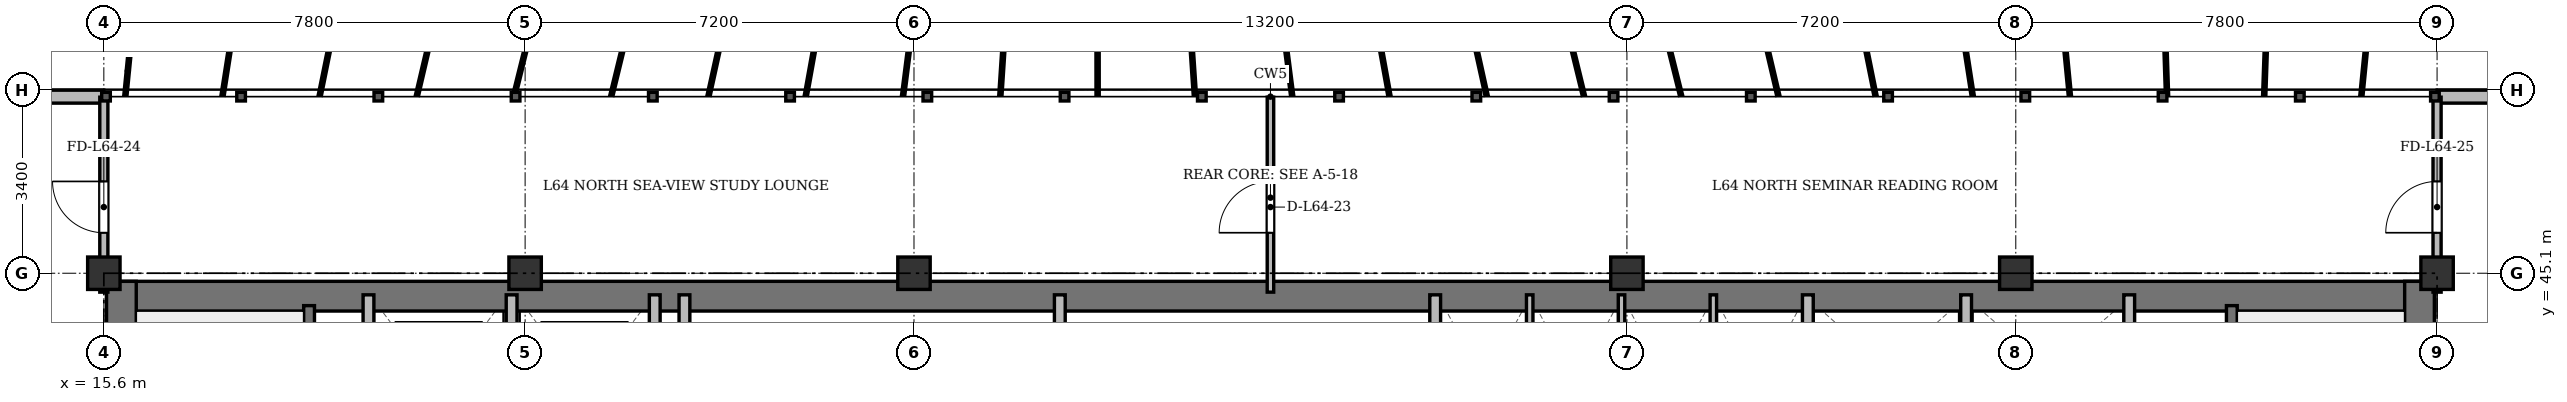
"""IFC4 building model, lengths in metres.
Left out: names, types, materials, properties, quantities, classifications, styles, units other than length and angle.
Written with IfcOpenShell. Run it as: python <this file> out.ifc"""

import sys

from ifc_helpers import new_model, si_unit, direction, frame, frame_2d, origin, origin_2d, place, context, subcontext, project, spatial, rectangle, extrude, source, transform, mapped, element, fill, save


model = new_model("IFC4")
c1 = context("Model", 3, precision=1e-05, world=origin(), true_north=direction((0.0, 1.0)))
c2 = subcontext(c1, "Body", "Model", "MODEL_VIEW")
j1 = project(units=[si_unit("LENGTHUNIT", "METRE"), si_unit("PLANEANGLEUNIT", "RADIAN")], contexts=[c1])
p1 = place(None, origin())
s1 = spatial("IfcSite", under=j1, at=p1, CompositionType="ELEMENT")
p2 = place(p1, origin())
s2 = spatial("IfcBuilding", under=s1, at=p2, CompositionType="ELEMENT")
p3 = place(p2, frame((0.0, 0.0, 248.7)))
s3 = spatial("IfcBuildingStorey", under=s2, at=p3, CompositionType="ELEMENT", Elevation=248.7)
m1 = source(origin(), c2, "Body", "SweptSolid", [
    extrude(rectangle(XDim=0.6, YDim=0.6, at=origin_2d()), origin(), (0.0, 0.0, 1.0), 3.6),
])
for number, where, z_axis, x_axis in (
    (1, (15.6, 45.1, 0.0), (0.0, 0.0, 1.0), (1.0, 0.0, 0.0)),
    (2, (23.4, 45.1, 0.0), (0.0, 0.0, 1.0), (1.0, 0.0, 0.0)),
    (3, (30.6, 45.1, 0.0), (0.0, 0.0, 1.0), (1.0, 0.0, 0.0)),
    (4, (43.8, 45.1, 0.0), (0.0, 0.0, 1.0), (1.0, 0.0, 0.0)),
    (5, (51.0, 45.1, 0.0), (0.0, 0.0, 1.0), (1.0, 0.0, 0.0)),
    (6, (58.8, 45.1, 0.0), (0.0, 0.0, 1.0), (1.0, 0.0, 0.0)),
):
    element("IfcColumn", number, at=place(p3, frame(where, z_axis=z_axis, x_axis=x_axis)), inside=s3, PredefinedType="COLUMN", context=c2, shape_type="MappedRepresentation", body=[
        mapped(m1, transform((0.0, 0.0, 0.0), x_axis=(1.0, 0.0, 0.0), y_axis=(0.0, 1.0, 0.0), z_axis=(0.0, 0.0, 1.0), scale=1.0)),
    ])
p4 = place(p3, frame((11.3, 48.37, 0.0), z_axis=(0.0, 0.0, 1.0), x_axis=(1.0, 0.0, 0.0)))
e7 = element("IfcWall", 7, at=p4, inside=s3, PredefinedType="SOLIDWALL", context=c2, shape_type="SweptSolid", body=[
    extrude(rectangle(XDim=4.3, YDim=0.24, at=frame_2d((2.15, 0.0))), origin(), (0.0, 0.0, 1.0), 3.37),
])
p5 = place(p4, frame((1.46, 0.0, 0.9)))
e8 = element("IfcOpeningElement", 8, at=p5, cuts=e7, PredefinedType="OPENING", context=c2, shape_type="SweptSolid", body=[
    extrude(rectangle(XDim=1.2, YDim=1.65, at=frame_2d((0.6, 0.825))), frame((0.0, 0.13, 0.0), z_axis=(0.0, -1.0, 0.0), x_axis=(1.0, 0.0, 0.0)), (0.0, 0.0, 1.0), 0.26),
])
p6 = place(p3, frame((58.8, 48.37, 0.0), z_axis=(0.0, 0.0, 1.0), x_axis=(1.0, 0.0, 0.0)))
e9 = element("IfcWall", 9, at=p6, inside=s3, PredefinedType="SOLIDWALL", context=c2, shape_type="SweptSolid", body=[
    extrude(rectangle(XDim=4.3, YDim=0.24, at=frame_2d((2.15, 0.0))), origin(), (0.0, 0.0, 1.0), 3.37),
])
p7 = place(p6, frame((1.46, 0.0, 0.9)))
e10 = element("IfcOpeningElement", 10, at=p7, cuts=e9, PredefinedType="OPENING", context=c2, shape_type="SweptSolid", body=[
    extrude(rectangle(XDim=1.2, YDim=1.65, at=frame_2d((0.6, 0.825))), frame((0.0, 0.13, 0.0), z_axis=(0.0, -1.0, 0.0), x_axis=(1.0, 0.0, 0.0)), (0.0, 0.0, 1.0), 0.26),
])
p8 = place(p3, frame((15.65, 44.675, 0.0), z_axis=(0.0, 0.0, 1.0), x_axis=(1.0, 0.0, 0.0)))
e11 = element("IfcWall", 11, at=p8, inside=s3, PredefinedType="SHEAR", context=c2, shape_type="SweptSolid", body=[
    extrude(rectangle(XDim=43.1, YDim=0.55, at=frame_2d((21.55, 0.0))), origin(), (0.0, 0.0, 1.0), 3.37),
])
for number, where, z_axis, x_axis in (
    (12, (15.925, 33.4, 0.0), (0.0, 0.0, 1.0), (0.0, 1.0, 0.0)),
    (13, (58.475, 33.4, 0.0), (0.0, 0.0, 1.0), (0.0, 1.0, 0.0)),
):
    element("IfcWall", number, at=place(p3, frame(where, z_axis=z_axis, x_axis=x_axis)), inside=s3, PredefinedType="SHEAR", context=c2, shape_type="SweptSolid", body=[
        extrude(rectangle(XDim=11.55, YDim=0.55, at=frame_2d((5.775, 0.0))), origin(), (0.0, 0.0, 1.0), 3.37),
    ])
p9 = place(p3, frame((19.4, 33.4, 0.0), z_axis=(0.0, 0.0, 1.0), x_axis=(0.0, 1.0, 0.0)))
e14 = element("IfcWall", 14, at=p9, inside=s3, PredefinedType="SHEAR", context=c2, shape_type="SweptSolid", body=[
    extrude(rectangle(XDim=11.1, YDim=0.2, at=frame_2d((5.55, 0.0))), origin(), (0.0, 0.0, 1.0), 3.37),
])
p10 = place(p9, frame((0.85, 0.0, 0.0)))
e15 = element("IfcOpeningElement", 15, at=p10, cuts=e14, PredefinedType="OPENING", context=c2, shape_type="SweptSolid", body=[
    extrude(rectangle(XDim=1.1, YDim=2.15, at=frame_2d((0.55, 1.075))), frame((0.0, 0.11, 0.0), z_axis=(0.0, -1.0, 0.0), x_axis=(1.0, 0.0, 0.0)), (0.0, 0.0, 1.0), 0.22),
])
p11 = place(p3, frame((55.0, 33.4, 0.0), z_axis=(0.0, 0.0, 1.0), x_axis=(0.0, 1.0, 0.0)))
e16 = element("IfcWall", 16, at=p11, inside=s3, PredefinedType="SHEAR", context=c2, shape_type="SweptSolid", body=[
    extrude(rectangle(XDim=11.1, YDim=0.2, at=frame_2d((5.55, 0.0))), origin(), (0.0, 0.0, 1.0), 3.37),
])
p12 = place(p11, frame((0.85, 0.0, 0.0)))
e17 = element("IfcOpeningElement", 17, at=p12, cuts=e16, PredefinedType="OPENING", context=c2, shape_type="SweptSolid", body=[
    extrude(rectangle(XDim=1.1, YDim=2.15, at=frame_2d((0.55, 1.075))), frame((0.0, 0.11, 0.0), z_axis=(0.0, -1.0, 0.0), x_axis=(1.0, 0.0, 0.0)), (0.0, 0.0, 1.0), 0.22),
])
for number, where, z_axis, x_axis in (
    (18, (20.5, 41.3, 0.0), (0.0, 0.0, 1.0), (0.0, 1.0, 0.0)),
    (19, (23.15, 41.3, 0.0), (0.0, 0.0, 1.0), (0.0, 1.0, 0.0)),
    (20, (25.8, 41.3, 0.0), (0.0, 0.0, 1.0), (0.0, 1.0, 0.0)),
):
    element("IfcWall", number, at=place(p3, frame(where, z_axis=z_axis, x_axis=x_axis)), inside=s3, PredefinedType="SOLIDWALL", context=c2, shape_type="SweptSolid", body=[
        extrude(rectangle(XDim=3.4, YDim=0.2, at=frame_2d((1.7, 0.0))), origin(), (0.0, 0.0, 1.0), 3.37),
    ])
for number, where, z_axis, x_axis in (
    (21, (26.35, 33.4, 0.0), (0.0, 0.0, 1.0), (0.0, 1.0, 0.0)),
    (22, (33.3, 33.4, 0.0), (0.0, 0.0, 1.0), (0.0, 1.0, 0.0)),
):
    element("IfcWall", number, at=place(p3, frame(where, z_axis=z_axis, x_axis=x_axis)), inside=s3, PredefinedType="SOLIDWALL", context=c2, shape_type="SweptSolid", body=[
        extrude(rectangle(XDim=11.3, YDim=0.2, at=frame_2d((5.65, 0.0))), origin(), (0.0, 0.0, 1.0), 2.92),
    ])
p13 = place(p3, frame((40.25, 41.5, 0.0), z_axis=(0.0, 0.0, 1.0), x_axis=(0.0, 1.0, 0.0)))
e23 = element("IfcWall", 23, at=p13, inside=s3, PredefinedType="SOLIDWALL", context=c2, shape_type="SweptSolid", body=[
    extrude(rectangle(XDim=3.2, YDim=0.2, at=frame_2d((1.6, 0.0))), origin(), (0.0, 0.0, 1.0), 3.37),
])
for number, where, z_axis, x_axis in (
    (24, (42.0, 41.5, 0.0), (0.0, 0.0, 1.0), (0.0, 1.0, 0.0)),
    (25, (43.7, 41.5, 0.0), (0.0, 0.0, 1.0), (0.0, 1.0, 0.0)),
    (26, (45.4, 41.5, 0.0), (0.0, 0.0, 1.0), (0.0, 1.0, 0.0)),
):
    element("IfcWall", number, at=place(p3, frame(where, z_axis=z_axis, x_axis=x_axis)), inside=s3, PredefinedType="PARTITIONING", context=c2, shape_type="SweptSolid", body=[
        extrude(rectangle(XDim=3.2, YDim=0.12, at=frame_2d((1.6, 0.0))), origin(), (0.0, 0.0, 1.0), 3.37),
    ])
p14 = place(p3, frame((47.15, 33.4, 0.0), z_axis=(0.0, 0.0, 1.0), x_axis=(0.0, 1.0, 0.0)))
e27 = element("IfcWall", 27, at=p14, inside=s3, PredefinedType="SOLIDWALL", context=c2, shape_type="SweptSolid", body=[
    extrude(rectangle(XDim=11.3, YDim=0.2, at=frame_2d((5.65, 0.0))), origin(), (0.0, 0.0, 1.0), 2.92),
])
for number, where, z_axis, x_axis in (
    (28, (50.08, 42.05, 0.0), (0.0, 0.0, 1.0), (0.0, 1.0, 0.0)),
    (29, (53.1, 42.05, 0.0), (0.0, 0.0, 1.0), (0.0, 1.0, 0.0)),
):
    element("IfcWall", number, at=place(p3, frame(where, z_axis=z_axis, x_axis=x_axis)), inside=s3, PredefinedType="SOLIDWALL", context=c2, shape_type="SweptSolid", body=[
        extrude(rectangle(XDim=2.65, YDim=0.2, at=frame_2d((1.325, 0.0))), origin(), (0.0, 0.0, 1.0), 3.37),
    ])
p15 = place(p3, frame((37.2, 44.75, 0.0), z_axis=(0.0, 0.0, 1.0), x_axis=(0.0, 1.0, 0.0)))
e30 = element("IfcWall", 30, at=p15, inside=s3, PredefinedType="PARTITIONING", context=c2, shape_type="SweptSolid", body=[
    extrude(rectangle(XDim=3.61, YDim=0.12, at=frame_2d((1.805, 0.0))), origin(), (0.0, 0.0, 1.0), 2.92),
])
p16 = place(p15, frame((1.1, 0.0, 0.0)))
e31 = element("IfcOpeningElement", 31, at=p16, cuts=e30, PredefinedType="OPENING", context=c2, shape_type="SweptSolid", body=[
    extrude(rectangle(XDim=0.95, YDim=2.15, at=frame_2d((0.475, 1.075))), frame((0.0, 0.07, 0.0), z_axis=(0.0, -1.0, 0.0), x_axis=(1.0, 0.0, 0.0)), (0.0, 0.0, 1.0), 0.14),
])
p17 = place(p3, frame((15.6, 44.75, 0.0), z_axis=(0.0, 0.0, 1.0), x_axis=(0.0, 1.0, 0.0)))
e32 = element("IfcWall", 32, at=p17, inside=s3, PredefinedType="PARTITIONING", context=c2, shape_type="SweptSolid", body=[
    extrude(rectangle(XDim=3.61, YDim=0.15, at=frame_2d((1.805, 0.0))), origin(), (0.0, 0.0, 1.0), 2.87),
])
p18 = place(p17, frame((1.1, 0.0, 0.0)))
e33 = element("IfcOpeningElement", 33, at=p18, cuts=e32, PredefinedType="OPENING", context=c2, shape_type="SweptSolid", body=[
    extrude(rectangle(XDim=0.95, YDim=2.15, at=frame_2d((0.475, 1.075))), frame((0.0, 0.085, 0.0), z_axis=(0.0, -1.0, 0.0), x_axis=(1.0, 0.0, 0.0)), (0.0, 0.0, 1.0), 0.17),
])
p19 = place(p3, frame((58.8, 44.75, 0.0), z_axis=(0.0, 0.0, 1.0), x_axis=(0.0, 1.0, 0.0)))
e34 = element("IfcWall", 34, at=p19, inside=s3, PredefinedType="PARTITIONING", context=c2, shape_type="SweptSolid", body=[
    extrude(rectangle(XDim=3.61, YDim=0.15, at=frame_2d((1.805, 0.0))), origin(), (0.0, 0.0, 1.0), 2.87),
])
p20 = place(p19, frame((1.1, 0.0, 0.0)))
e35 = element("IfcOpeningElement", 35, at=p20, cuts=e34, PredefinedType="OPENING", context=c2, shape_type="SweptSolid", body=[
    extrude(rectangle(XDim=0.95, YDim=2.15, at=frame_2d((0.475, 1.075))), frame((0.0, 0.085, 0.0), z_axis=(0.0, -1.0, 0.0), x_axis=(1.0, 0.0, 0.0)), (0.0, 0.0, 1.0), 0.17),
])
m2 = source(origin(), c2, "Body", "SweptSolid", [
    extrude(rectangle(XDim=0.95, YDim=2.15, at=frame_2d((0.475, 1.075))), frame((0.0, 0.025, 0.0), z_axis=(0.0, -1.0, 0.0), x_axis=(1.0, 0.0, 0.0)), (0.0, 0.0, 1.0), 0.05),
])
p21 = place(p16, origin())
e36 = element("IfcDoor", 36, at=p21, inside=s3, OperationType="SINGLE_SWING_LEFT", PredefinedType="DOOR", context=c2, shape_type="MappedRepresentation", body=[
    mapped(m2, transform((0.0, 0.0, 0.0), x_axis=(1.0, 0.0, 0.0), y_axis=(0.0, 1.0, 0.0), z_axis=(0.0, 0.0, 1.0), scale=1.0)),
])
fill(e31, e36)
p22 = place(p18, origin())
e37 = element("IfcDoor", 37, at=p22, inside=s3, OperationType="SINGLE_SWING_RIGHT", PredefinedType="DOOR", context=c2, shape_type="MappedRepresentation", body=[
    mapped(m2, transform((0.0, 0.0, 0.0), x_axis=(1.0, 0.0, 0.0), y_axis=(0.0, 1.0, 0.0), z_axis=(0.0, 0.0, 1.0), scale=1.0)),
])
fill(e33, e37)
p23 = place(p20, origin())
e38 = element("IfcDoor", 38, at=p23, inside=s3, OperationType="SINGLE_SWING_LEFT", PredefinedType="DOOR", context=c2, shape_type="MappedRepresentation", body=[
    mapped(m2, transform((0.0, 0.0, 0.0), x_axis=(1.0, 0.0, 0.0), y_axis=(0.0, 1.0, 0.0), z_axis=(0.0, 0.0, 1.0), scale=1.0)),
])
fill(e35, e38)
save(model, sys.argv[1])
